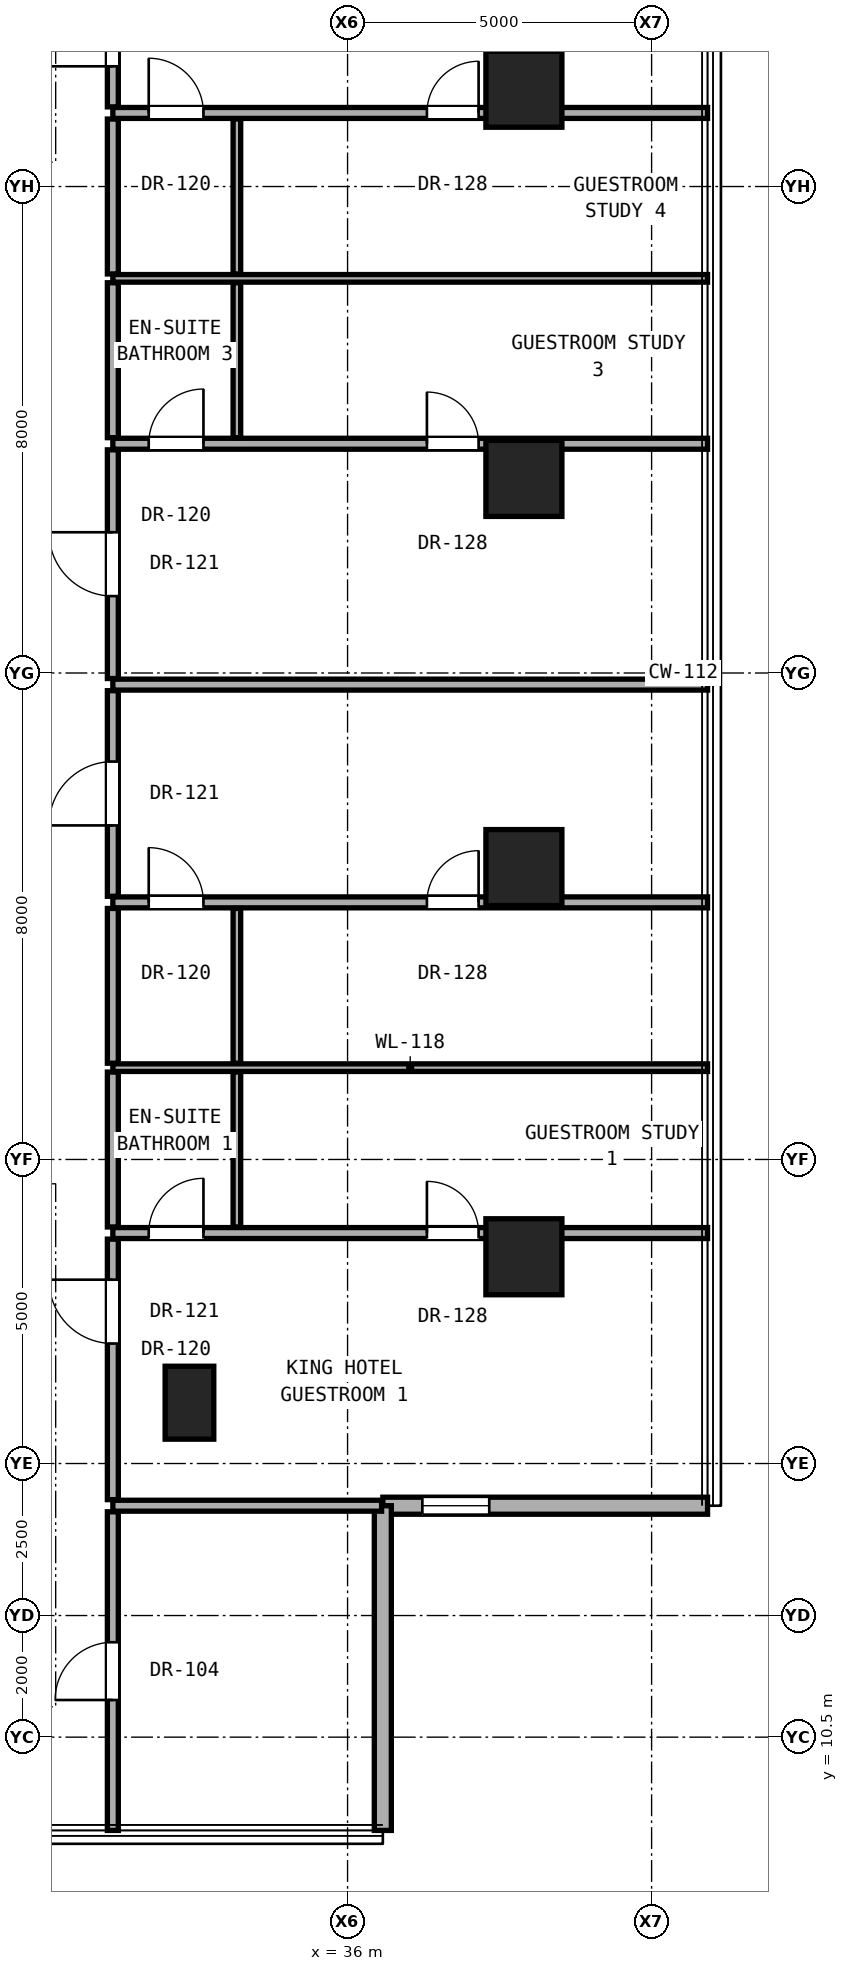
"""IFC4 building model, lengths in metres.
Left out: names, types, materials, properties, quantities, classifications, styles, units other than length and angle.
Written with IfcOpenShell. Run it as: python <this file> out.ifc"""

import sys

from ifc_helpers import new_model, si_unit, direction, frame, frame_2d, origin, origin_2d, place, context, subcontext, project, spatial, rectangle, hollow_rectangle, extrude, element, fill, save


model = new_model("IFC4")
c1 = context("Model", 3, precision=1e-05, world=origin(), true_north=direction((0.0, 1.0)))
c2 = subcontext(c1, "Body", "Model", "MODEL_VIEW")
j1 = project(units=[si_unit("LENGTHUNIT", "METRE"), si_unit("PLANEANGLEUNIT", "RADIAN")], contexts=[c1])
p1 = place(None, origin())
s1 = spatial("IfcSite", under=j1, at=p1, CompositionType="ELEMENT")
p2 = place(p1, origin())
s2 = spatial("IfcBuilding", under=s1, at=p2, CompositionType="ELEMENT")
p3 = place(p2, frame((0.0, 0.0, 62.0)))
s3 = spatial("IfcBuildingStorey", under=s2, at=p3, CompositionType="ELEMENT", Elevation=62.0)
for number, where, z_axis, x_axis in (
    (1, (38.9, 18.4, 0.0), (0.0, 0.0, 1.0), (1.0, 0.0, 0.0)),
    (2, (38.9, 24.8, 0.0), (0.0, 0.0, 1.0), (1.0, 0.0, 0.0)),
    (3, (38.9, 31.2, 0.0), (0.0, 0.0, 1.0), (1.0, 0.0, 0.0)),
    (4, (38.9, 37.6, 0.0), (0.0, 0.0, 1.0), (1.0, 0.0, 0.0)),
):
    element("IfcColumn", number, at=place(p3, frame(where, z_axis=z_axis, x_axis=x_axis)), inside=s3, PredefinedType="COLUMN", context=c2, shape_type="SweptSolid", body=[
        extrude(hollow_rectangle(XDim=1.25, YDim=1.25, WallThickness=0.07, at=origin_2d()), origin(), (0.0, 0.0, 1.0), 3.3),
    ])
p4 = place(p3, frame((33.4, 16.0, 0.0), z_axis=(0.0, 0.0, 1.0), x_axis=(1.0, 0.0, 0.0)))
e5 = element("IfcColumn", 5, at=p4, inside=s3, PredefinedType="PILASTER", context=c2, shape_type="SweptSolid", body=[
    extrude(rectangle(XDim=0.8, YDim=1.2, at=origin_2d()), origin(), (0.0, 0.0, 1.0), 3.3),
])
p5 = place(p3, frame((36.58, 14.306, 0.0), z_axis=(0.0, 0.0, 1.0), x_axis=(1.0, 0.0, 0.0)))
e6 = element("IfcWall", 6, at=p5, inside=s3, PredefinedType="SOLIDWALL", context=c2, shape_type="SweptSolid", body=[
    extrude(rectangle(XDim=5.34, YDim=0.28, at=frame_2d((2.67, 0.0))), origin(), (0.0, 0.0, 1.0), 3.04),
])
p6 = place(p5, frame((0.65, 0.0, 0.85)))
e7 = element("IfcOpeningElement", 7, at=p6, cuts=e6, PredefinedType="OPENING", context=c2, shape_type="SweptSolid", body=[
    extrude(rectangle(XDim=1.1, YDim=2.0, at=frame_2d((0.55, 1.0))), frame((0.0, 0.15, 0.0), z_axis=(0.0, -1.0, 0.0), x_axis=(1.0, 0.0, 0.0)), (0.0, 0.0, 1.0), 0.3),
])
p7 = place(p3, frame((36.58, 8.966, 0.0), z_axis=(0.0, 0.0, 1.0), x_axis=(0.0, 1.0, 0.0)))
e8 = element("IfcWall", 8, at=p7, inside=s3, PredefinedType="SOLIDWALL", context=c2, shape_type="SweptSolid", body=[
    extrude(rectangle(XDim=5.34, YDim=0.28, at=frame_2d((2.67, 0.0))), origin(), (0.0, 0.0, 1.0), 3.04),
])
p8 = place(p3, frame((32.14, 14.306, 0.0), z_axis=(0.0, 0.0, 1.0), x_axis=(1.0, 0.0, 0.0)))
e9 = element("IfcWall", 9, at=p8, inside=s3, PredefinedType="PARTITIONING", context=c2, shape_type="SweptSolid", body=[
    extrude(rectangle(XDim=4.42, YDim=0.18, at=frame_2d((2.21, 0.0))), origin(), (0.0, 0.0, 1.0), 3.06),
])
p9 = place(p3, frame((32.14, 18.79, 0.0), z_axis=(0.0, 0.0, 1.0), x_axis=(1.0, 0.0, 0.0)))
e10 = element("IfcWall", 10, at=p9, inside=s3, PredefinedType="PARTITIONING", context=c2, shape_type="SweptSolid", body=[
    extrude(rectangle(XDim=9.78, YDim=0.18, at=frame_2d((4.89, 0.0))), origin(), (0.0, 0.0, 1.0), 2.125),
])
p10 = place(p9, frame((5.165, 0.0, 0.0)))
e11 = element("IfcOpeningElement", 11, at=p10, cuts=e10, PredefinedType="OPENING", context=c2, shape_type="SweptSolid", body=[
    extrude(rectangle(XDim=0.85, YDim=2.01, at=frame_2d((0.425, 1.005))), frame((0.0, 0.1, 0.0), z_axis=(0.0, -1.0, 0.0), x_axis=(1.0, 0.0, 0.0)), (0.0, 0.0, 1.0), 0.2),
])
p11 = place(p9, frame((0.59, 0.0, 0.0)))
e12 = element("IfcOpeningElement", 12, at=p11, cuts=e10, PredefinedType="OPENING", context=c2, shape_type="SweptSolid", body=[
    extrude(rectangle(XDim=0.9, YDim=2.1, at=frame_2d((0.45, 1.05))), frame((0.0, 0.1, 0.0), z_axis=(0.0, -1.0, 0.0), x_axis=(1.0, 0.0, 0.0)), (0.0, 0.0, 1.0), 0.2),
])
p12 = place(p3, frame((32.14, 21.51, 0.0), z_axis=(0.0, 0.0, 1.0), x_axis=(1.0, 0.0, 0.0)))
e13 = element("IfcWall", 13, at=p12, inside=s3, PredefinedType="PARTITIONING", context=c2, shape_type="SweptSolid", body=[
    extrude(rectangle(XDim=9.78, YDim=0.125, at=frame_2d((4.89, 0.0))), origin(), (0.0, 0.0, 1.0), 2.125),
])
p13 = place(p3, frame((32.14, 24.228, 0.0), z_axis=(0.0, 0.0, 1.0), x_axis=(1.0, 0.0, 0.0)))
e14 = element("IfcWall", 14, at=p13, inside=s3, PredefinedType="PARTITIONING", context=c2, shape_type="SweptSolid", body=[
    extrude(rectangle(XDim=9.78, YDim=0.18, at=frame_2d((4.89, 0.0))), origin(), (0.0, 0.0, 1.0), 2.125),
])
p14 = place(p13, frame((5.165, 0.0, 0.0)))
e15 = element("IfcOpeningElement", 15, at=p14, cuts=e14, PredefinedType="OPENING", context=c2, shape_type="SweptSolid", body=[
    extrude(rectangle(XDim=0.85, YDim=2.01, at=frame_2d((0.425, 1.005))), frame((0.0, 0.1, 0.0), z_axis=(0.0, -1.0, 0.0), x_axis=(1.0, 0.0, 0.0)), (0.0, 0.0, 1.0), 0.2),
])
p15 = place(p13, frame((0.59, 0.0, 0.0)))
e16 = element("IfcOpeningElement", 16, at=p15, cuts=e14, PredefinedType="OPENING", context=c2, shape_type="SweptSolid", body=[
    extrude(rectangle(XDim=0.9, YDim=2.1, at=frame_2d((0.45, 1.05))), frame((0.0, 0.1, 0.0), z_axis=(0.0, -1.0, 0.0), x_axis=(1.0, 0.0, 0.0)), (0.0, 0.0, 1.0), 0.2),
])
p16 = place(p3, frame((32.14, 27.809, 0.0), z_axis=(0.0, 0.0, 1.0), x_axis=(1.0, 0.0, 0.0)))
e17 = element("IfcWall", 17, at=p16, inside=s3, PredefinedType="PARTITIONING", context=c2, shape_type="SweptSolid", body=[
    extrude(rectangle(XDim=9.78, YDim=0.18, at=frame_2d((4.89, 0.0))), origin(), (0.0, 0.0, 1.0), 2.125),
])
p17 = place(p3, frame((32.14, 31.77, 0.0), z_axis=(0.0, 0.0, 1.0), x_axis=(1.0, 0.0, 0.0)))
e18 = element("IfcWall", 18, at=p17, inside=s3, PredefinedType="PARTITIONING", context=c2, shape_type="SweptSolid", body=[
    extrude(rectangle(XDim=9.78, YDim=0.18, at=frame_2d((4.89, 0.0))), origin(), (0.0, 0.0, 1.0), 2.125),
])
p18 = place(p17, frame((5.165, 0.0, 0.0)))
e19 = element("IfcOpeningElement", 19, at=p18, cuts=e18, PredefinedType="OPENING", context=c2, shape_type="SweptSolid", body=[
    extrude(rectangle(XDim=0.85, YDim=2.01, at=frame_2d((0.425, 1.005))), frame((0.0, 0.1, 0.0), z_axis=(0.0, -1.0, 0.0), x_axis=(1.0, 0.0, 0.0)), (0.0, 0.0, 1.0), 0.2),
])
p19 = place(p17, frame((0.59, 0.0, 0.0)))
e20 = element("IfcOpeningElement", 20, at=p19, cuts=e18, PredefinedType="OPENING", context=c2, shape_type="SweptSolid", body=[
    extrude(rectangle(XDim=0.9, YDim=2.1, at=frame_2d((0.45, 1.05))), frame((0.0, 0.1, 0.0), z_axis=(0.0, -1.0, 0.0), x_axis=(1.0, 0.0, 0.0)), (0.0, 0.0, 1.0), 0.2),
])
p20 = place(p3, frame((32.14, 34.49, 0.0), z_axis=(0.0, 0.0, 1.0), x_axis=(1.0, 0.0, 0.0)))
e21 = element("IfcWall", 21, at=p20, inside=s3, PredefinedType="PARTITIONING", context=c2, shape_type="SweptSolid", body=[
    extrude(rectangle(XDim=9.78, YDim=0.125, at=frame_2d((4.89, 0.0))), origin(), (0.0, 0.0, 1.0), 2.125),
])
p21 = place(p3, frame((32.14, 37.21, 0.0), z_axis=(0.0, 0.0, 1.0), x_axis=(1.0, 0.0, 0.0)))
e22 = element("IfcWall", 22, at=p21, inside=s3, PredefinedType="PARTITIONING", context=c2, shape_type="SweptSolid", body=[
    extrude(rectangle(XDim=9.78, YDim=0.18, at=frame_2d((4.89, 0.0))), origin(), (0.0, 0.0, 1.0), 2.125),
])
p22 = place(p21, frame((5.165, 0.0, 0.0)))
e23 = element("IfcOpeningElement", 23, at=p22, cuts=e22, PredefinedType="OPENING", context=c2, shape_type="SweptSolid", body=[
    extrude(rectangle(XDim=0.85, YDim=2.01, at=frame_2d((0.425, 1.005))), frame((0.0, 0.1, 0.0), z_axis=(0.0, -1.0, 0.0), x_axis=(1.0, 0.0, 0.0)), (0.0, 0.0, 1.0), 0.2),
])
p23 = place(p21, frame((0.59, 0.0, 0.0)))
e24 = element("IfcOpeningElement", 24, at=p23, cuts=e22, PredefinedType="OPENING", context=c2, shape_type="SweptSolid", body=[
    extrude(rectangle(XDim=0.9, YDim=2.1, at=frame_2d((0.45, 1.05))), frame((0.0, 0.1, 0.0), z_axis=(0.0, -1.0, 0.0), x_axis=(1.0, 0.0, 0.0)), (0.0, 0.0, 1.0), 0.2),
])
p24 = place(p3, frame((32.14, 8.966, 0.0), z_axis=(0.0, 0.0, 1.0), x_axis=(0.0, 1.0, 0.0)))
e25 = element("IfcWall", 25, at=p24, inside=s3, PredefinedType="PARTITIONING", context=c2, shape_type="SweptSolid", body=[
    extrude(rectangle(XDim=5.24, YDim=0.18, at=frame_2d((2.62, 0.0))), origin(), (0.0, 0.0, 1.0), 3.06),
])
p25 = place(p24, frame((2.145, 0.0, 0.0)))
e26 = element("IfcOpeningElement", 26, at=p25, cuts=e25, PredefinedType="OPENING", context=c2, shape_type="SweptSolid", body=[
    extrude(rectangle(XDim=0.95, YDim=2.15, at=frame_2d((0.475, 1.075))), frame((0.0, 0.1, 0.0), z_axis=(0.0, -1.0, 0.0), x_axis=(1.0, 0.0, 0.0)), (0.0, 0.0, 1.0), 0.2),
])
p26 = place(p3, frame((32.14, 14.406, 0.0), z_axis=(0.0, 0.0, 1.0), x_axis=(0.0, 1.0, 0.0)))
e27 = element("IfcWall", 27, at=p26, inside=s3, PredefinedType="PARTITIONING", context=c2, shape_type="SweptSolid", body=[
    extrude(rectangle(XDim=4.284, YDim=0.18, at=frame_2d((2.142, 0.0))), origin(), (0.0, 0.0, 1.0), 2.436),
])
p27 = place(p26, frame((2.567, 0.0, 0.0)))
e28 = element("IfcOpeningElement", 28, at=p27, cuts=e27, PredefinedType="OPENING", context=c2, shape_type="SweptSolid", body=[
    extrude(rectangle(XDim=1.05, YDim=2.2, at=frame_2d((0.525, 1.1))), frame((0.0, 0.1, 0.0), z_axis=(0.0, -1.0, 0.0), x_axis=(1.0, 0.0, 0.0)), (0.0, 0.0, 1.0), 0.2),
])
p28 = place(p3, frame((32.14, 18.89, 0.0), z_axis=(0.0, 0.0, 1.0), x_axis=(0.0, 1.0, 0.0)))
e29 = element("IfcWall", 29, at=p28, inside=s3, PredefinedType="PARTITIONING", context=c2, shape_type="SweptSolid", body=[
    extrude(rectangle(XDim=2.548, YDim=0.18, at=frame_2d((1.274, 0.0))), origin(), (0.0, 0.0, 1.0), 3.06),
])
p29 = place(p3, frame((32.14, 21.583, 0.0), z_axis=(0.0, 0.0, 1.0), x_axis=(0.0, 1.0, 0.0)))
e30 = element("IfcWall", 30, at=p29, inside=s3, PredefinedType="PARTITIONING", context=c2, shape_type="SweptSolid", body=[
    extrude(rectangle(XDim=2.545, YDim=0.18, at=frame_2d((1.273, 0.0))), origin(), (0.0, 0.0, 1.0), 3.06),
])
p30 = place(p3, frame((32.14, 24.328, 0.0), z_axis=(0.0, 0.0, 1.0), x_axis=(0.0, 1.0, 0.0)))
e31 = element("IfcWall", 31, at=p30, inside=s3, PredefinedType="PARTITIONING", context=c2, shape_type="SweptSolid", body=[
    extrude(rectangle(XDim=3.381, YDim=0.18, at=frame_2d((1.69, 0.0))), origin(), (0.0, 0.0, 1.0), 2.279),
])
p31 = place(p30, frame((1.166, 0.0, 0.0)))
e32 = element("IfcOpeningElement", 32, at=p31, cuts=e31, PredefinedType="OPENING", context=c2, shape_type="SweptSolid", body=[
    extrude(rectangle(XDim=1.05, YDim=2.2, at=frame_2d((0.525, 1.1))), frame((0.0, 0.1, 0.0), z_axis=(0.0, -1.0, 0.0), x_axis=(1.0, 0.0, 0.0)), (0.0, 0.0, 1.0), 0.2),
])
p32 = place(p3, frame((32.14, 27.909, 0.0), z_axis=(0.0, 0.0, 1.0), x_axis=(0.0, 1.0, 0.0)))
e33 = element("IfcWall", 33, at=p32, inside=s3, PredefinedType="PARTITIONING", context=c2, shape_type="SweptSolid", body=[
    extrude(rectangle(XDim=3.761, YDim=0.18, at=frame_2d((1.88, 0.0))), origin(), (0.0, 0.0, 1.0), 2.279),
])
p33 = place(p32, frame((1.355, 0.0, 0.0)))
e34 = element("IfcOpeningElement", 34, at=p33, cuts=e33, PredefinedType="OPENING", context=c2, shape_type="SweptSolid", body=[
    extrude(rectangle(XDim=1.05, YDim=2.2, at=frame_2d((0.525, 1.1))), frame((0.0, 0.1, 0.0), z_axis=(0.0, -1.0, 0.0), x_axis=(1.0, 0.0, 0.0)), (0.0, 0.0, 1.0), 0.2),
])
p34 = place(p3, frame((32.14, 31.87, 0.0), z_axis=(0.0, 0.0, 1.0), x_axis=(0.0, 1.0, 0.0)))
e35 = element("IfcWall", 35, at=p34, inside=s3, PredefinedType="PARTITIONING", context=c2, shape_type="SweptSolid", body=[
    extrude(rectangle(XDim=2.547, YDim=0.18, at=frame_2d((1.274, 0.0))), origin(), (0.0, 0.0, 1.0), 3.06),
])
p35 = place(p3, frame((32.14, 34.562, 0.0), z_axis=(0.0, 0.0, 1.0), x_axis=(0.0, 1.0, 0.0)))
e36 = element("IfcWall", 36, at=p35, inside=s3, PredefinedType="PARTITIONING", context=c2, shape_type="SweptSolid", body=[
    extrude(rectangle(XDim=2.548, YDim=0.18, at=frame_2d((1.274, 0.0))), origin(), (0.0, 0.0, 1.0), 3.06),
])
p36 = place(p3, frame((32.14, 37.31, 0.0), z_axis=(0.0, 0.0, 1.0), x_axis=(0.0, 1.0, 0.0)))
e37 = element("IfcWall", 37, at=p36, inside=s3, PredefinedType="PARTITIONING", context=c2, shape_type="SweptSolid", body=[
    extrude(rectangle(XDim=4.284, YDim=0.18, at=frame_2d((2.142, 0.0))), origin(), (0.0, 0.0, 1.0), 2.436),
])
p37 = place(p36, frame((0.667, 0.0, 0.0)))
e38 = element("IfcOpeningElement", 38, at=p37, cuts=e37, PredefinedType="OPENING", context=c2, shape_type="SweptSolid", body=[
    extrude(rectangle(XDim=1.05, YDim=2.2, at=frame_2d((0.525, 1.1))), frame((0.0, 0.1, 0.0), z_axis=(0.0, -1.0, 0.0), x_axis=(1.0, 0.0, 0.0)), (0.0, 0.0, 1.0), 0.2),
])
p38 = place(p3, frame((34.18, 18.89, 0.0), z_axis=(0.0, 0.0, 1.0), x_axis=(0.0, 1.0, 0.0)))
e39 = element("IfcWall", 39, at=p38, inside=s3, PredefinedType="PARTITIONING", context=c2, shape_type="SweptSolid", body=[
    extrude(rectangle(XDim=2.548, YDim=0.125, at=frame_2d((1.274, 0.0))), origin(), (0.0, 0.0, 1.0), 3.06),
])
p39 = place(p3, frame((34.18, 21.583, 0.0), z_axis=(0.0, 0.0, 1.0), x_axis=(0.0, 1.0, 0.0)))
e40 = element("IfcWall", 40, at=p39, inside=s3, PredefinedType="PARTITIONING", context=c2, shape_type="SweptSolid", body=[
    extrude(rectangle(XDim=2.545, YDim=0.125, at=frame_2d((1.273, 0.0))), origin(), (0.0, 0.0, 1.0), 3.06),
])
p40 = place(p3, frame((34.18, 31.87, 0.0), z_axis=(0.0, 0.0, 1.0), x_axis=(0.0, 1.0, 0.0)))
e41 = element("IfcWall", 41, at=p40, inside=s3, PredefinedType="PARTITIONING", context=c2, shape_type="SweptSolid", body=[
    extrude(rectangle(XDim=2.547, YDim=0.125, at=frame_2d((1.274, 0.0))), origin(), (0.0, 0.0, 1.0), 3.06),
])
p41 = place(p3, frame((34.18, 34.562, 0.0), z_axis=(0.0, 0.0, 1.0), x_axis=(0.0, 1.0, 0.0)))
e42 = element("IfcWall", 42, at=p41, inside=s3, PredefinedType="PARTITIONING", context=c2, shape_type="SweptSolid", body=[
    extrude(rectangle(XDim=2.548, YDim=0.125, at=frame_2d((1.274, 0.0))), origin(), (0.0, 0.0, 1.0), 3.06),
])
p42 = place(p6, origin())
e43 = element("IfcWindow", 43, at=p42, inside=s3, PartitioningType="SINGLE_PANEL", PredefinedType="WINDOW", context=c2, shape_type="SweptSolid", body=[
    extrude(rectangle(XDim=1.1, YDim=2.0, at=frame_2d((0.55, 1.0))), frame((0.0, 0.03, 0.0), z_axis=(0.0, -1.0, 0.0), x_axis=(1.0, 0.0, 0.0)), (0.0, 0.0, 1.0), 0.06),
])
fill(e7, e43)
p43 = place(p27, origin())
e44 = element("IfcDoor", 44, at=p43, inside=s3, OperationType="SINGLE_SWING_RIGHT", PredefinedType="DOOR", context=c2, shape_type="SweptSolid", body=[
    extrude(rectangle(XDim=1.05, YDim=2.2, at=frame_2d((0.525, 1.1))), frame((0.0, 0.025, 0.0), z_axis=(0.0, -1.0, 0.0), x_axis=(1.0, 0.0, 0.0)), (0.0, 0.0, 1.0), 0.05),
])
fill(e28, e44)
p44 = place(p10, origin())
e45 = element("IfcDoor", 45, at=p44, inside=s3, OperationType="SINGLE_SWING_LEFT", PredefinedType="DOOR", context=c2, shape_type="SweptSolid", body=[
    extrude(rectangle(XDim=0.85, YDim=2.01, at=frame_2d((0.425, 1.005))), frame((0.0, 0.025, 0.0), z_axis=(0.0, -1.0, 0.0), x_axis=(1.0, 0.0, 0.0)), (0.0, 0.0, 1.0), 0.05),
])
fill(e11, e45)
p45 = place(p11, origin())
e46 = element("IfcDoor", 46, at=p45, inside=s3, OperationType="SINGLE_SWING_RIGHT", PredefinedType="DOOR", context=c2, shape_type="SweptSolid", body=[
    extrude(rectangle(XDim=0.9, YDim=2.1, at=frame_2d((0.45, 1.05))), frame((0.0, 0.025, 0.0), z_axis=(0.0, -1.0, 0.0), x_axis=(1.0, 0.0, 0.0)), (0.0, 0.0, 1.0), 0.05),
])
fill(e12, e46)
p46 = place(p31, origin())
e47 = element("IfcDoor", 47, at=p46, inside=s3, OperationType="SINGLE_SWING_LEFT", PredefinedType="DOOR", context=c2, shape_type="SweptSolid", body=[
    extrude(rectangle(XDim=1.05, YDim=2.2, at=frame_2d((0.525, 1.1))), frame((0.0, 0.025, 0.0), z_axis=(0.0, -1.0, 0.0), x_axis=(1.0, 0.0, 0.0)), (0.0, 0.0, 1.0), 0.05),
])
fill(e32, e47)
p47 = place(p14, origin())
e48 = element("IfcDoor", 48, at=p47, inside=s3, OperationType="SINGLE_SWING_RIGHT", PredefinedType="DOOR", context=c2, shape_type="SweptSolid", body=[
    extrude(rectangle(XDim=0.85, YDim=2.01, at=frame_2d((0.425, 1.005))), frame((0.0, 0.025, 0.0), z_axis=(0.0, -1.0, 0.0), x_axis=(1.0, 0.0, 0.0)), (0.0, 0.0, 1.0), 0.05),
])
fill(e15, e48)
p48 = place(p15, origin())
e49 = element("IfcDoor", 49, at=p48, inside=s3, OperationType="SINGLE_SWING_LEFT", PredefinedType="DOOR", context=c2, shape_type="SweptSolid", body=[
    extrude(rectangle(XDim=0.9, YDim=2.1, at=frame_2d((0.45, 1.05))), frame((0.0, 0.025, 0.0), z_axis=(0.0, -1.0, 0.0), x_axis=(1.0, 0.0, 0.0)), (0.0, 0.0, 1.0), 0.05),
])
fill(e16, e49)
p49 = place(p33, origin())
e50 = element("IfcDoor", 50, at=p49, inside=s3, OperationType="SINGLE_SWING_RIGHT", PredefinedType="DOOR", context=c2, shape_type="SweptSolid", body=[
    extrude(rectangle(XDim=1.05, YDim=2.2, at=frame_2d((0.525, 1.1))), frame((0.0, 0.025, 0.0), z_axis=(0.0, -1.0, 0.0), x_axis=(1.0, 0.0, 0.0)), (0.0, 0.0, 1.0), 0.05),
])
fill(e34, e50)
p50 = place(p18, origin())
e51 = element("IfcDoor", 51, at=p50, inside=s3, OperationType="SINGLE_SWING_LEFT", PredefinedType="DOOR", context=c2, shape_type="SweptSolid", body=[
    extrude(rectangle(XDim=0.85, YDim=2.01, at=frame_2d((0.425, 1.005))), frame((0.0, 0.025, 0.0), z_axis=(0.0, -1.0, 0.0), x_axis=(1.0, 0.0, 0.0)), (0.0, 0.0, 1.0), 0.05),
])
fill(e19, e51)
p51 = place(p19, origin())
e52 = element("IfcDoor", 52, at=p51, inside=s3, OperationType="SINGLE_SWING_RIGHT", PredefinedType="DOOR", context=c2, shape_type="SweptSolid", body=[
    extrude(rectangle(XDim=0.9, YDim=2.1, at=frame_2d((0.45, 1.05))), frame((0.0, 0.025, 0.0), z_axis=(0.0, -1.0, 0.0), x_axis=(1.0, 0.0, 0.0)), (0.0, 0.0, 1.0), 0.05),
])
fill(e20, e52)
p52 = place(p37, origin())
e53 = element("IfcDoor", 53, at=p52, inside=s3, OperationType="SINGLE_SWING_LEFT", PredefinedType="DOOR", context=c2, shape_type="SweptSolid", body=[
    extrude(rectangle(XDim=1.05, YDim=2.2, at=frame_2d((0.525, 1.1))), frame((0.0, 0.025, 0.0), z_axis=(0.0, -1.0, 0.0), x_axis=(1.0, 0.0, 0.0)), (0.0, 0.0, 1.0), 0.05),
])
fill(e38, e53)
p53 = place(p22, origin())
e54 = element("IfcDoor", 54, at=p53, inside=s3, OperationType="SINGLE_SWING_RIGHT", PredefinedType="DOOR", context=c2, shape_type="SweptSolid", body=[
    extrude(rectangle(XDim=0.85, YDim=2.01, at=frame_2d((0.425, 1.005))), frame((0.0, 0.025, 0.0), z_axis=(0.0, -1.0, 0.0), x_axis=(1.0, 0.0, 0.0)), (0.0, 0.0, 1.0), 0.05),
])
fill(e23, e54)
p54 = place(p23, origin())
e55 = element("IfcDoor", 55, at=p54, inside=s3, OperationType="SINGLE_SWING_LEFT", PredefinedType="DOOR", context=c2, shape_type="SweptSolid", body=[
    extrude(rectangle(XDim=0.9, YDim=2.1, at=frame_2d((0.45, 1.05))), frame((0.0, 0.025, 0.0), z_axis=(0.0, -1.0, 0.0), x_axis=(1.0, 0.0, 0.0)), (0.0, 0.0, 1.0), 0.05),
])
fill(e24, e55)
p55 = place(p25, origin())
e56 = element("IfcDoor", 56, at=p55, inside=s3, OperationType="SINGLE_SWING_LEFT", PredefinedType="DOOR", context=c2, shape_type="SweptSolid", body=[
    extrude(rectangle(XDim=0.95, YDim=2.15, at=frame_2d((0.475, 1.075))), frame((0.0, 0.025, 0.0), z_axis=(0.0, -1.0, 0.0), x_axis=(1.0, 0.0, 0.0)), (0.0, 0.0, 1.0), 0.05),
])
fill(e26, e56)
save(model, sys.argv[1])
